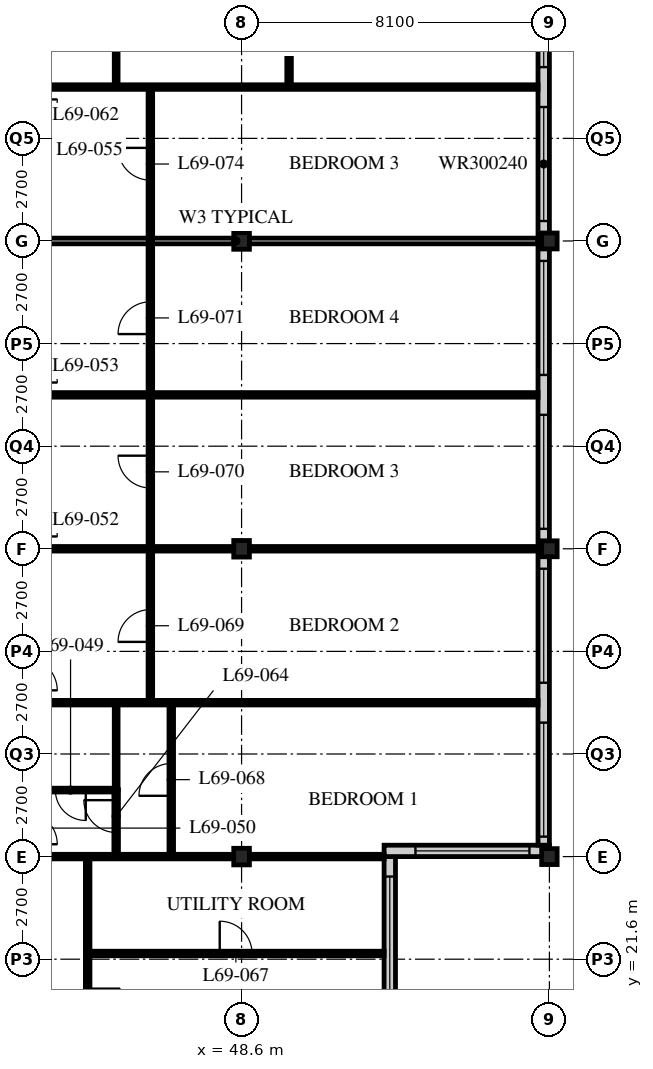
"""IFC4 building model, lengths in metres.
Left out: names, types, materials, properties, quantities, classifications, styles, units other than length and angle.
Written with IfcOpenShell. Run it as: python <this file> out.ifc"""

import sys

from ifc_helpers import new_model, si_unit, direction, frame, frame_2d, origin, origin_2d, place, context, subcontext, project, spatial, rectangle, i_section, extrude, element, fill, save


model = new_model("IFC4")
c1 = context("Model", 3, precision=1e-05, world=origin(), true_north=direction((0.0, 1.0)))
c2 = subcontext(c1, "Body", "Model", "MODEL_VIEW")
j1 = project(units=[si_unit("LENGTHUNIT", "METRE"), si_unit("PLANEANGLEUNIT", "RADIAN")], contexts=[c1])
p1 = place(None, origin())
s1 = spatial("IfcSite", under=j1, at=p1, CompositionType="ELEMENT")
p2 = place(p1, origin())
s2 = spatial("IfcBuilding", under=s1, at=p2, CompositionType="ELEMENT")
p3 = place(p2, frame((0.0, 0.0, 269.7)))
s3 = spatial("IfcBuildingStorey", under=s2, at=p3, CompositionType="ELEMENT", Elevation=269.7)
for number, where, z_axis, x_axis in (
    (1, (48.6, 24.3, 0.0), (0.0, 0.0, 1.0), (1.0, 0.0, 0.0)),
    (2, (48.6, 32.4, 0.0), (0.0, 0.0, 1.0), (1.0, 0.0, 0.0)),
    (3, (48.6, 40.5, 0.0), (0.0, 0.0, 1.0), (1.0, 0.0, 0.0)),
):
    element("IfcColumn", number, at=place(p3, frame(where, z_axis=z_axis, x_axis=x_axis)), inside=s3, PredefinedType="COLUMN", context=c2, shape_type="SweptSolid", body=[
        extrude(i_section(OverallWidth=0.412, OverallDepth=0.437, WebThickness=0.036, FlangeThickness=0.058, FilletRadius=0.015, at=origin_2d()), origin(), (0.0, 0.0, 1.0), 3.9),
    ])
for number, where, z_axis, x_axis in (
    (4, (56.7, 24.3, 0.0), (0.0, 0.0, 1.0), (1.0, 0.0, 0.0)),
    (5, (56.7, 32.4, 0.0), (0.0, 0.0, 1.0), (1.0, 0.0, 0.0)),
    (6, (56.7, 40.5, 0.0), (0.0, 0.0, 1.0), (1.0, 0.0, 0.0)),
):
    element("IfcColumn", number, at=place(p3, frame(where, z_axis=z_axis, x_axis=x_axis)), inside=s3, PredefinedType="COLUMN", context=c2, shape_type="SweptSolid", body=[
        extrude(i_section(OverallWidth=0.407, OverallDepth=0.419, WebThickness=0.031, FlangeThickness=0.049, FilletRadius=0.015, at=origin_2d()), origin(), (0.0, 0.0, 1.0), 3.9),
    ])
p4 = place(p3, frame((52.5, 20.55, 0.0), z_axis=(0.0, 0.0, 1.0), x_axis=(0.0, 1.0, 0.0)))
e7 = element("IfcWall", 7, at=p4, inside=s3, PredefinedType="SOLIDWALL", context=c2, shape_type="SweptSolid", body=[
    extrude(rectangle(XDim=3.75, YDim=0.3, at=frame_2d((1.875, 0.0))), origin(), (0.0, 0.0, 1.0), 3.69),
])
p5 = place(p4, frame((0.225, 0.0, 0.6)))
e8 = element("IfcOpeningElement", 8, at=p5, cuts=e7, PredefinedType="OPENING", context=c2, shape_type="SweptSolid", body=[
    extrude(rectangle(XDim=3.0, YDim=2.3, at=frame_2d((1.5, 1.15))), frame((0.0, 0.16, 0.0), z_axis=(0.0, -1.0, 0.0), x_axis=(1.0, 0.0, 0.0)), (0.0, 0.0, 1.0), 0.32),
])
p6 = place(p3, frame((52.35, 24.45, 0.0), z_axis=(0.0, 0.0, 1.0), x_axis=(1.0, 0.0, 0.0)))
e9 = element("IfcWall", 9, at=p6, inside=s3, PredefinedType="SOLIDWALL", context=c2, shape_type="SweptSolid", body=[
    extrude(rectangle(XDim=4.35, YDim=0.3, at=frame_2d((2.175, 0.0))), origin(), (0.0, 0.0, 1.0), 3.69),
])
p7 = place(p6, frame((0.825, 0.0, 0.6)))
e10 = element("IfcOpeningElement", 10, at=p7, cuts=e9, PredefinedType="OPENING", context=c2, shape_type="SweptSolid", body=[
    extrude(rectangle(XDim=3.0, YDim=2.3, at=frame_2d((1.5, 1.15))), frame((0.0, 0.16, 0.0), z_axis=(0.0, -1.0, 0.0), x_axis=(1.0, 0.0, 0.0)), (0.0, 0.0, 1.0), 0.32),
])
p8 = place(p3, frame((56.55, 24.6, 0.0), z_axis=(0.0, 0.0, 1.0), x_axis=(0.0, 1.0, 0.0)))
e11 = element("IfcWall", 11, at=p8, inside=s3, PredefinedType="SOLIDWALL", context=c2, shape_type="SweptSolid", body=[
    extrude(rectangle(XDim=32.1, YDim=0.3, at=frame_2d((16.05, 0.0))), origin(), (0.0, 0.0, 1.0), 3.69),
])
p9 = place(p8, frame((0.225, 0.0, 0.6)))
e12 = element("IfcOpeningElement", 12, at=p9, cuts=e11, PredefinedType="OPENING", context=c2, shape_type="SweptSolid", body=[
    extrude(rectangle(XDim=3.0, YDim=2.4, at=frame_2d((1.5, 1.2))), frame((0.0, 0.16, 0.0), z_axis=(0.0, -1.0, 0.0), x_axis=(1.0, 0.0, 0.0)), (0.0, 0.0, 1.0), 0.32),
])
p10 = place(p8, frame((4.275, 0.0, 0.6)))
e13 = element("IfcOpeningElement", 13, at=p10, cuts=e11, PredefinedType="OPENING", context=c2, shape_type="SweptSolid", body=[
    extrude(rectangle(XDim=3.0, YDim=2.4, at=frame_2d((1.5, 1.2))), frame((0.0, 0.16, 0.0), z_axis=(0.0, -1.0, 0.0), x_axis=(1.0, 0.0, 0.0)), (0.0, 0.0, 1.0), 0.32),
])
p11 = place(p8, frame((8.325, 0.0, 0.6)))
e14 = element("IfcOpeningElement", 14, at=p11, cuts=e11, PredefinedType="OPENING", context=c2, shape_type="SweptSolid", body=[
    extrude(rectangle(XDim=3.0, YDim=2.4, at=frame_2d((1.5, 1.2))), frame((0.0, 0.16, 0.0), z_axis=(0.0, -1.0, 0.0), x_axis=(1.0, 0.0, 0.0)), (0.0, 0.0, 1.0), 0.32),
])
p12 = place(p8, frame((12.375, 0.0, 0.6)))
e15 = element("IfcOpeningElement", 15, at=p12, cuts=e11, PredefinedType="OPENING", context=c2, shape_type="SweptSolid", body=[
    extrude(rectangle(XDim=3.0, YDim=2.4, at=frame_2d((1.5, 1.2))), frame((0.0, 0.16, 0.0), z_axis=(0.0, -1.0, 0.0), x_axis=(1.0, 0.0, 0.0)), (0.0, 0.0, 1.0), 0.32),
])
p13 = place(p8, frame((16.425, 0.0, 0.6)))
e16 = element("IfcOpeningElement", 16, at=p13, cuts=e11, PredefinedType="OPENING", context=c2, shape_type="SweptSolid", body=[
    extrude(rectangle(XDim=3.0, YDim=2.4, at=frame_2d((1.5, 1.2))), frame((0.0, 0.16, 0.0), z_axis=(0.0, -1.0, 0.0), x_axis=(1.0, 0.0, 0.0)), (0.0, 0.0, 1.0), 0.32),
])
p14 = place(p8, frame((20.475, 0.0, 0.6)))
e17 = element("IfcOpeningElement", 17, at=p14, cuts=e11, PredefinedType="OPENING", context=c2, shape_type="SweptSolid", body=[
    extrude(rectangle(XDim=3.0, YDim=2.4, at=frame_2d((1.5, 1.2))), frame((0.0, 0.16, 0.0), z_axis=(0.0, -1.0, 0.0), x_axis=(1.0, 0.0, 0.0)), (0.0, 0.0, 1.0), 0.32),
])
p15 = place(p8, frame((24.525, 0.0, 0.6)))
e18 = element("IfcOpeningElement", 18, at=p15, cuts=e11, PredefinedType="OPENING", context=c2, shape_type="SweptSolid", body=[
    extrude(rectangle(XDim=3.0, YDim=2.4, at=frame_2d((1.5, 1.2))), frame((0.0, 0.16, 0.0), z_axis=(0.0, -1.0, 0.0), x_axis=(1.0, 0.0, 0.0)), (0.0, 0.0, 1.0), 0.32),
])
p16 = place(p8, frame((28.575, 0.0, 0.6)))
e19 = element("IfcOpeningElement", 19, at=p16, cuts=e11, PredefinedType="OPENING", context=c2, shape_type="SweptSolid", body=[
    extrude(rectangle(XDim=3.0, YDim=2.4, at=frame_2d((1.5, 1.2))), frame((0.0, 0.16, 0.0), z_axis=(0.0, -1.0, 0.0), x_axis=(1.0, 0.0, 0.0)), (0.0, 0.0, 1.0), 0.32),
])
p17 = place(p3, frame((42.9, 24.3, 0.0), z_axis=(0.0, 0.0, 1.0), x_axis=(1.0, 0.0, 0.0)))
e20 = element("IfcWall", 20, at=p17, inside=s3, PredefinedType="PARTITIONING", context=c2, shape_type="SweptSolid", body=[
    extrude(rectangle(XDim=9.45, YDim=0.12, at=frame_2d((4.725, 0.0))), origin(), (0.0, 0.0, 1.0), 3.078),
])
p18 = place(p3, frame((40.5, 40.5, 0.0), z_axis=(0.0, 0.0, 1.0), x_axis=(1.0, 0.0, 0.0)))
e21 = element("IfcWall", 21, at=p18, inside=s3, PredefinedType="PARTITIONING", context=c2, shape_type="SweptSolid", body=[
    extrude(rectangle(XDim=15.9, YDim=0.15, at=frame_2d((7.95, 0.0))), origin(), (0.0, 0.0, 1.0), 3.078),
])
p19 = place(p3, frame((44.55, 16.5, 0.0), z_axis=(0.0, 0.0, 1.0), x_axis=(0.0, 1.0, 0.0)))
e22 = element("IfcWall", 22, at=p19, inside=s3, PredefinedType="PARTITIONING", context=c2, shape_type="SweptSolid", body=[
    extrude(rectangle(XDim=7.8, YDim=0.12, at=frame_2d((3.9, 0.0))), origin(), (0.0, 0.0, 1.0), 3.69),
])
p20 = place(p19, frame((3.475, 0.0, 0.0)))
e23 = element("IfcOpeningElement", 23, at=p20, cuts=e22, PredefinedType="OPENING", context=c2, shape_type="SweptSolid", body=[
    extrude(rectangle(XDim=0.85, YDim=2.1, at=frame_2d((0.425, 1.05))), frame((0.0, 0.07, 0.0), z_axis=(0.0, -1.0, 0.0), x_axis=(1.0, 0.0, 0.0)), (0.0, 0.0, 1.0), 0.14),
])
p21 = place(p3, frame((42.9, 26.05, 0.0), z_axis=(0.0, 0.0, 1.0), x_axis=(1.0, 0.0, 0.0)))
e24 = element("IfcWall", 24, at=p21, inside=s3, PredefinedType="PARTITIONING", context=c2, shape_type="SweptSolid", body=[
    extrude(rectangle(XDim=2.4, YDim=0.1, at=frame_2d((1.2, 0.0))), origin(), (0.0, 0.0, 1.0), 3.69),
])
p22 = place(p21, frame((0.8, 0.0, 0.0)))
e25 = element("IfcOpeningElement", 25, at=p22, cuts=e24, PredefinedType="OPENING", context=c2, shape_type="SweptSolid", body=[
    extrude(rectangle(XDim=0.8, YDim=2.1, at=frame_2d((0.4, 1.05))), frame((0.0, 0.06, 0.0), z_axis=(0.0, -1.0, 0.0), x_axis=(1.0, 0.0, 0.0)), (0.0, 0.0, 1.0), 0.12),
])
p23 = place(p3, frame((45.3, 26.05, 0.0), z_axis=(0.0, 0.0, 1.0), x_axis=(0.0, 1.0, 0.0)))
e26 = element("IfcWall", 26, at=p23, inside=s3, PredefinedType="PARTITIONING", context=c2, shape_type="SweptSolid", body=[
    extrude(rectangle(XDim=2.3, YDim=0.1, at=frame_2d((1.15, 0.0))), origin(), (0.0, 0.0, 1.0), 3.69),
])
p24 = place(p3, frame((42.9, 28.35, 0.0), z_axis=(0.0, 0.0, 1.0), x_axis=(1.0, 0.0, 0.0)))
e27 = element("IfcWall", 27, at=p24, inside=s3, PredefinedType="PARTITIONING", context=c2, shape_type="SweptSolid", body=[
    extrude(rectangle(XDim=13.5, YDim=0.12, at=frame_2d((6.75, 0.0))), origin(), (0.0, 0.0, 1.0), 3.69),
])
p25 = place(p3, frame((42.9, 32.4, 0.0), z_axis=(0.0, 0.0, 1.0), x_axis=(1.0, 0.0, 0.0)))
e28 = element("IfcWall", 28, at=p25, inside=s3, PredefinedType="PARTITIONING", context=c2, shape_type="SweptSolid", body=[
    extrude(rectangle(XDim=13.5, YDim=0.12, at=frame_2d((6.75, 0.0))), origin(), (0.0, 0.0, 1.0), 3.078),
])
p26 = place(p3, frame((42.9, 36.45, 0.0), z_axis=(0.0, 0.0, 1.0), x_axis=(1.0, 0.0, 0.0)))
e29 = element("IfcWall", 29, at=p26, inside=s3, PredefinedType="PARTITIONING", context=c2, shape_type="SweptSolid", body=[
    extrude(rectangle(XDim=13.5, YDim=0.12, at=frame_2d((6.75, 0.0))), origin(), (0.0, 0.0, 1.0), 3.69),
])
p27 = place(p3, frame((45.3, 46.85, 0.0), z_axis=(0.0, 0.0, 1.0), x_axis=(0.0, -1.0, 0.0)))
e30 = element("IfcWall", 30, at=p27, inside=s3, PredefinedType="PARTITIONING", context=c2, shape_type="SweptSolid", body=[
    extrude(rectangle(XDim=2.3, YDim=0.1, at=frame_2d((1.15, 0.0))), origin(), (0.0, 0.0, 1.0), 3.69),
])
p28 = place(p3, frame((42.9, 44.55, 0.0), z_axis=(0.0, 0.0, 1.0), x_axis=(1.0, 0.0, 0.0)))
e31 = element("IfcWall", 31, at=p28, inside=s3, PredefinedType="PARTITIONING", context=c2, shape_type="SweptSolid", body=[
    extrude(rectangle(XDim=13.5, YDim=0.12, at=frame_2d((6.75, 0.0))), origin(), (0.0, 0.0, 1.0), 3.69),
])
p29 = place(p3, frame((45.3, 24.3, 0.0), z_axis=(0.0, 0.0, 1.0), x_axis=(0.0, 1.0, 0.0)))
e32 = element("IfcWall", 32, at=p29, inside=s3, PredefinedType="PARTITIONING", context=c2, shape_type="SweptSolid", body=[
    extrude(rectangle(XDim=1.76, YDim=0.12, at=frame_2d((0.88, 0.0))), origin(), (0.0, 0.0, 1.0), 3.69),
])
p30 = place(p29, frame((0.635, 0.0, 0.0)))
e33 = element("IfcOpeningElement", 33, at=p30, cuts=e32, PredefinedType="OPENING", context=c2, shape_type="SweptSolid", body=[
    extrude(rectangle(XDim=0.85, YDim=2.1, at=frame_2d((0.425, 1.05))), frame((0.0, 0.07, 0.0), z_axis=(0.0, -1.0, 0.0), x_axis=(1.0, 0.0, 0.0)), (0.0, 0.0, 1.0), 0.14),
])
p31 = place(p3, frame((44.55, 21.75, 0.0), z_axis=(0.0, 0.0, 1.0), x_axis=(1.0, 0.0, 0.0)))
e34 = element("IfcWall", 34, at=p31, inside=s3, PredefinedType="PARTITIONING", context=c2, shape_type="SweptSolid", body=[
    extrude(rectangle(XDim=7.8, YDim=0.12, at=frame_2d((3.9, 0.0))), origin(), (0.0, 0.0, 1.0), 3.69),
])
p32 = place(p31, frame((3.475, 0.0, 0.0)))
e35 = element("IfcOpeningElement", 35, at=p32, cuts=e34, PredefinedType="OPENING", context=c2, shape_type="SweptSolid", body=[
    extrude(rectangle(XDim=0.85, YDim=2.1, at=frame_2d((0.425, 1.05))), frame((0.0, 0.07, 0.0), z_axis=(0.0, -1.0, 0.0), x_axis=(1.0, 0.0, 0.0)), (0.0, 0.0, 1.0), 0.14),
])
p33 = place(p3, frame((46.75, 24.3, 0.0), z_axis=(0.0, 0.0, 1.0), x_axis=(0.0, 1.0, 0.0)))
e36 = element("IfcWall", 36, at=p33, inside=s3, PredefinedType="PARTITIONING", context=c2, shape_type="SweptSolid", body=[
    extrude(rectangle(XDim=4.05, YDim=0.12, at=frame_2d((2.025, 0.0))), origin(), (0.0, 0.0, 1.0), 3.69),
])
p34 = place(p33, frame((1.6, 0.0, 0.0)))
e37 = element("IfcOpeningElement", 37, at=p34, cuts=e36, PredefinedType="OPENING", context=c2, shape_type="SweptSolid", body=[
    extrude(rectangle(XDim=0.85, YDim=2.1, at=frame_2d((0.425, 1.05))), frame((0.0, 0.07, 0.0), z_axis=(0.0, -1.0, 0.0), x_axis=(1.0, 0.0, 0.0)), (0.0, 0.0, 1.0), 0.14),
])
p35 = place(p3, frame((46.2, 28.35, 0.0), z_axis=(0.0, 0.0, 1.0), x_axis=(0.0, 1.0, 0.0)))
e38 = element("IfcWall", 38, at=p35, inside=s3, PredefinedType="PARTITIONING", context=c2, shape_type="SweptSolid", body=[
    extrude(rectangle(XDim=16.2, YDim=0.12, at=frame_2d((8.1, 0.0))), origin(), (0.0, 0.0, 1.0), 3.69),
])
p36 = place(p35, frame((1.6, 0.0, 0.0)))
e39 = element("IfcOpeningElement", 39, at=p36, cuts=e38, PredefinedType="OPENING", context=c2, shape_type="SweptSolid", body=[
    extrude(rectangle(XDim=0.85, YDim=2.1, at=frame_2d((0.425, 1.05))), frame((0.0, 0.07, 0.0), z_axis=(0.0, -1.0, 0.0), x_axis=(1.0, 0.0, 0.0)), (0.0, 0.0, 1.0), 0.14),
])
p37 = place(p35, frame((5.65, 0.0, 0.0)))
e40 = element("IfcOpeningElement", 40, at=p37, cuts=e38, PredefinedType="OPENING", context=c2, shape_type="SweptSolid", body=[
    extrude(rectangle(XDim=0.85, YDim=2.1, at=frame_2d((0.425, 1.05))), frame((0.0, 0.07, 0.0), z_axis=(0.0, -1.0, 0.0), x_axis=(1.0, 0.0, 0.0)), (0.0, 0.0, 1.0), 0.14),
])
p38 = place(p35, frame((9.7, 0.0, 0.0)))
e41 = element("IfcOpeningElement", 41, at=p38, cuts=e38, PredefinedType="OPENING", context=c2, shape_type="SweptSolid", body=[
    extrude(rectangle(XDim=0.85, YDim=2.1, at=frame_2d((0.425, 1.05))), frame((0.0, 0.07, 0.0), z_axis=(0.0, -1.0, 0.0), x_axis=(1.0, 0.0, 0.0)), (0.0, 0.0, 1.0), 0.14),
])
p39 = place(p35, frame((13.75, 0.0, 0.0)))
e42 = element("IfcOpeningElement", 42, at=p39, cuts=e38, PredefinedType="OPENING", context=c2, shape_type="SweptSolid", body=[
    extrude(rectangle(XDim=0.85, YDim=2.1, at=frame_2d((0.425, 1.05))), frame((0.0, 0.07, 0.0), z_axis=(0.0, -1.0, 0.0), x_axis=(1.0, 0.0, 0.0)), (0.0, 0.0, 1.0), 0.14),
])
p40 = place(p3, frame((49.85, 44.55, 0.0), z_axis=(0.0, 0.0, 1.0), x_axis=(0.0, 1.0, 0.0)))
e43 = element("IfcWall", 43, at=p40, inside=s3, PredefinedType="PARTITIONING", context=c2, shape_type="SweptSolid", body=[
    extrude(rectangle(XDim=6.3, YDim=0.12, at=frame_2d((3.15, 0.0))), origin(), (0.0, 0.0, 1.0), 3.69),
])
p41 = place(p40, frame((2.725, 0.0, 0.0)))
e44 = element("IfcOpeningElement", 44, at=p41, cuts=e43, PredefinedType="OPENING", context=c2, shape_type="SweptSolid", body=[
    extrude(rectangle(XDim=0.85, YDim=2.1, at=frame_2d((0.425, 1.05))), frame((0.0, 0.07, 0.0), z_axis=(0.0, -1.0, 0.0), x_axis=(1.0, 0.0, 0.0)), (0.0, 0.0, 1.0), 0.14),
])
p42 = place(p5, origin())
e45 = element("IfcWindow", 45, at=p42, inside=s3, PartitioningType="SINGLE_PANEL", PredefinedType="WINDOW", context=c2, shape_type="SweptSolid", body=[
    extrude(rectangle(XDim=3.0, YDim=2.3, at=frame_2d((1.5, 1.15))), frame((0.0, 0.03, 0.0), z_axis=(0.0, -1.0, 0.0), x_axis=(1.0, 0.0, 0.0)), (0.0, 0.0, 1.0), 0.06),
])
fill(e8, e45)
p43 = place(p7, origin())
e46 = element("IfcWindow", 46, at=p43, inside=s3, PartitioningType="SINGLE_PANEL", PredefinedType="WINDOW", context=c2, shape_type="SweptSolid", body=[
    extrude(rectangle(XDim=3.0, YDim=2.3, at=frame_2d((1.5, 1.15))), frame((0.0, 0.03, 0.0), z_axis=(0.0, -1.0, 0.0), x_axis=(1.0, 0.0, 0.0)), (0.0, 0.0, 1.0), 0.06),
])
fill(e10, e46)
p44 = place(p9, origin())
e47 = element("IfcWindow", 47, at=p44, inside=s3, PartitioningType="SINGLE_PANEL", PredefinedType="WINDOW", context=c2, shape_type="SweptSolid", body=[
    extrude(rectangle(XDim=3.0, YDim=2.4, at=frame_2d((1.5, 1.2))), frame((0.0, 0.03, 0.0), z_axis=(0.0, -1.0, 0.0), x_axis=(1.0, 0.0, 0.0)), (0.0, 0.0, 1.0), 0.06),
])
fill(e12, e47)
p45 = place(p10, origin())
e48 = element("IfcWindow", 48, at=p45, inside=s3, PartitioningType="SINGLE_PANEL", PredefinedType="WINDOW", context=c2, shape_type="SweptSolid", body=[
    extrude(rectangle(XDim=3.0, YDim=2.4, at=frame_2d((1.5, 1.2))), frame((0.0, 0.03, 0.0), z_axis=(0.0, -1.0, 0.0), x_axis=(1.0, 0.0, 0.0)), (0.0, 0.0, 1.0), 0.06),
])
fill(e13, e48)
p46 = place(p11, origin())
e49 = element("IfcWindow", 49, at=p46, inside=s3, PartitioningType="SINGLE_PANEL", PredefinedType="WINDOW", context=c2, shape_type="SweptSolid", body=[
    extrude(rectangle(XDim=3.0, YDim=2.4, at=frame_2d((1.5, 1.2))), frame((0.0, 0.03, 0.0), z_axis=(0.0, -1.0, 0.0), x_axis=(1.0, 0.0, 0.0)), (0.0, 0.0, 1.0), 0.06),
])
fill(e14, e49)
p47 = place(p12, origin())
e50 = element("IfcWindow", 50, at=p47, inside=s3, PartitioningType="SINGLE_PANEL", PredefinedType="WINDOW", context=c2, shape_type="SweptSolid", body=[
    extrude(rectangle(XDim=3.0, YDim=2.4, at=frame_2d((1.5, 1.2))), frame((0.0, 0.03, 0.0), z_axis=(0.0, -1.0, 0.0), x_axis=(1.0, 0.0, 0.0)), (0.0, 0.0, 1.0), 0.06),
])
fill(e15, e50)
p48 = place(p13, origin())
e51 = element("IfcWindow", 51, at=p48, inside=s3, PartitioningType="SINGLE_PANEL", PredefinedType="WINDOW", context=c2, shape_type="SweptSolid", body=[
    extrude(rectangle(XDim=3.0, YDim=2.4, at=frame_2d((1.5, 1.2))), frame((0.0, 0.03, 0.0), z_axis=(0.0, -1.0, 0.0), x_axis=(1.0, 0.0, 0.0)), (0.0, 0.0, 1.0), 0.06),
])
fill(e16, e51)
p49 = place(p14, origin())
e52 = element("IfcWindow", 52, at=p49, inside=s3, PartitioningType="SINGLE_PANEL", PredefinedType="WINDOW", context=c2, shape_type="SweptSolid", body=[
    extrude(rectangle(XDim=3.0, YDim=2.4, at=frame_2d((1.5, 1.2))), frame((0.0, 0.03, 0.0), z_axis=(0.0, -1.0, 0.0), x_axis=(1.0, 0.0, 0.0)), (0.0, 0.0, 1.0), 0.06),
])
fill(e17, e52)
p50 = place(p20, origin())
e53 = element("IfcDoor", 53, at=p50, inside=s3, OperationType="SINGLE_SWING_LEFT", PredefinedType="DOOR", context=c2, shape_type="SweptSolid", body=[
    extrude(rectangle(XDim=0.85, YDim=2.1, at=frame_2d((0.425, 1.05))), frame((0.0, 0.025, 0.0), z_axis=(0.0, -1.0, 0.0), x_axis=(1.0, 0.0, 0.0)), (0.0, 0.0, 1.0), 0.05),
])
fill(e23, e53)
p51 = place(p22, origin())
e54 = element("IfcDoor", 54, at=p51, inside=s3, OperationType="SINGLE_SWING_LEFT", PredefinedType="DOOR", context=c2, shape_type="SweptSolid", body=[
    extrude(rectangle(XDim=0.8, YDim=2.1, at=frame_2d((0.4, 1.05))), frame((0.0, 0.025, 0.0), z_axis=(0.0, -1.0, 0.0), x_axis=(1.0, 0.0, 0.0)), (0.0, 0.0, 1.0), 0.05),
])
fill(e25, e54)
p52 = place(p30, origin())
e55 = element("IfcDoor", 55, at=p52, inside=s3, OperationType="SINGLE_SWING_RIGHT", PredefinedType="DOOR", context=c2, shape_type="SweptSolid", body=[
    extrude(rectangle(XDim=0.85, YDim=2.1, at=frame_2d((0.425, 1.05))), frame((0.0, 0.025, 0.0), z_axis=(0.0, -1.0, 0.0), x_axis=(1.0, 0.0, 0.0)), (0.0, 0.0, 1.0), 0.05),
])
fill(e33, e55)
p53 = place(p32, origin())
e56 = element("IfcDoor", 56, at=p53, inside=s3, OperationType="SINGLE_SWING_LEFT", PredefinedType="DOOR", context=c2, shape_type="SweptSolid", body=[
    extrude(rectangle(XDim=0.85, YDim=2.1, at=frame_2d((0.425, 1.05))), frame((0.0, 0.025, 0.0), z_axis=(0.0, -1.0, 0.0), x_axis=(1.0, 0.0, 0.0)), (0.0, 0.0, 1.0), 0.05),
])
fill(e35, e56)
p54 = place(p34, origin())
e57 = element("IfcDoor", 57, at=p54, inside=s3, OperationType="SINGLE_SWING_LEFT", PredefinedType="DOOR", context=c2, shape_type="SweptSolid", body=[
    extrude(rectangle(XDim=0.85, YDim=2.1, at=frame_2d((0.425, 1.05))), frame((0.0, 0.025, 0.0), z_axis=(0.0, -1.0, 0.0), x_axis=(1.0, 0.0, 0.0)), (0.0, 0.0, 1.0), 0.05),
])
fill(e37, e57)
p55 = place(p36, origin())
e58 = element("IfcDoor", 58, at=p55, inside=s3, OperationType="SINGLE_SWING_LEFT", PredefinedType="DOOR", context=c2, shape_type="SweptSolid", body=[
    extrude(rectangle(XDim=0.85, YDim=2.1, at=frame_2d((0.425, 1.05))), frame((0.0, 0.025, 0.0), z_axis=(0.0, -1.0, 0.0), x_axis=(1.0, 0.0, 0.0)), (0.0, 0.0, 1.0), 0.05),
])
fill(e39, e58)
p56 = place(p37, origin())
e59 = element("IfcDoor", 59, at=p56, inside=s3, OperationType="SINGLE_SWING_RIGHT", PredefinedType="DOOR", context=c2, shape_type="SweptSolid", body=[
    extrude(rectangle(XDim=0.85, YDim=2.1, at=frame_2d((0.425, 1.05))), frame((0.0, 0.025, 0.0), z_axis=(0.0, -1.0, 0.0), x_axis=(1.0, 0.0, 0.0)), (0.0, 0.0, 1.0), 0.05),
])
fill(e40, e59)
p57 = place(p38, origin())
e60 = element("IfcDoor", 60, at=p57, inside=s3, OperationType="SINGLE_SWING_LEFT", PredefinedType="DOOR", context=c2, shape_type="SweptSolid", body=[
    extrude(rectangle(XDim=0.85, YDim=2.1, at=frame_2d((0.425, 1.05))), frame((0.0, 0.025, 0.0), z_axis=(0.0, -1.0, 0.0), x_axis=(1.0, 0.0, 0.0)), (0.0, 0.0, 1.0), 0.05),
])
fill(e41, e60)
p58 = place(p39, origin())
e61 = element("IfcDoor", 61, at=p58, inside=s3, OperationType="SINGLE_SWING_RIGHT", PredefinedType="DOOR", context=c2, shape_type="SweptSolid", body=[
    extrude(rectangle(XDim=0.85, YDim=2.1, at=frame_2d((0.425, 1.05))), frame((0.0, 0.025, 0.0), z_axis=(0.0, -1.0, 0.0), x_axis=(1.0, 0.0, 0.0)), (0.0, 0.0, 1.0), 0.05),
])
fill(e42, e61)
save(model, sys.argv[1])
